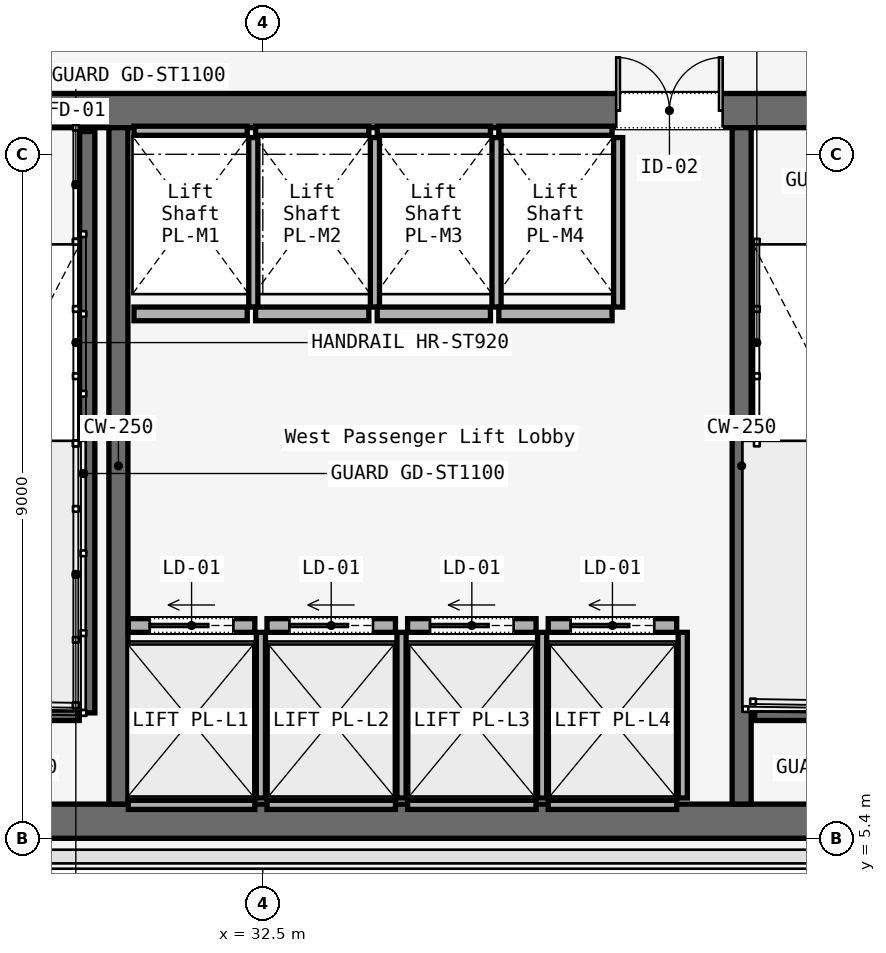
"""IFC4 building model, lengths in metres.
Left out: names, types, materials, properties, quantities, classifications, styles, units other than length and angle.
Written with IfcOpenShell. Run it as: python <this file> out.ifc"""

import sys

from ifc_helpers import new_model, si_unit, direction, frame, frame_2d, origin, place, context, subcontext, project, spatial, rectangle, extrude, element, fill, save


model = new_model("IFC4")
c1 = context("Model", 3, precision=1e-05, world=origin(), true_north=direction((0.0, 1.0)))
c2 = subcontext(c1, "Body", "Model", "MODEL_VIEW")
j1 = project(units=[si_unit("LENGTHUNIT", "METRE"), si_unit("PLANEANGLEUNIT", "RADIAN")], contexts=[c1])
p1 = place(None, origin())
s1 = spatial("IfcSite", under=j1, at=p1, CompositionType="ELEMENT")
p2 = place(p1, origin())
s2 = spatial("IfcBuilding", under=s1, at=p2, CompositionType="ELEMENT")
p3 = place(p2, frame((0.0, 0.0, 108.2)))
s3 = spatial("IfcBuildingStorey", under=s2, at=p3, CompositionType="ELEMENT", Elevation=108.2)
p4 = place(p3, frame((26.45, 14.975, 0.0), z_axis=(0.0, 0.0, 1.0), x_axis=(1.0, 0.0, 0.0)))
e1 = element("IfcWall", 1, at=p4, inside=s3, PredefinedType="SOLIDWALL", context=c2, shape_type="SweptSolid", body=[
    extrude(rectangle(XDim=31.1, YDim=0.45, at=frame_2d((15.55, 0.0))), origin(), (0.0, 0.0, 1.0), 3.52),
])
p5 = place(p4, frame((1.65, 0.0, 0.0)))
e2 = element("IfcOpeningElement", 2, at=p5, cuts=e1, PredefinedType="OPENING", context=c2, shape_type="SweptSolid", body=[
    extrude(rectangle(XDim=1.1, YDim=2.2, at=frame_2d((0.55, 1.1))), frame((0.0, 0.225, 0.0), z_axis=(0.0, -1.0, 0.0), x_axis=(1.0, 0.0, 0.0)), (0.0, 0.0, 1.0), 0.45),
])
p6 = place(p4, frame((13.65, 0.0, 0.0)))
e3 = element("IfcOpeningElement", 3, at=p6, cuts=e1, PredefinedType="OPENING", context=c2, shape_type="SweptSolid", body=[
    extrude(rectangle(XDim=1.1, YDim=2.2, at=frame_2d((0.55, 1.1))), frame((0.0, 0.225, 0.0), z_axis=(0.0, -1.0, 0.0), x_axis=(1.0, 0.0, 0.0)), (0.0, 0.0, 1.0), 0.45),
])
p7 = place(p4, frame((25.55, 0.0, 0.0)))
e4 = element("IfcOpeningElement", 4, at=p7, cuts=e1, PredefinedType="OPENING", context=c2, shape_type="SweptSolid", body=[
    extrude(rectangle(XDim=1.1, YDim=2.2, at=frame_2d((0.55, 1.1))), frame((0.0, 0.225, 0.0), z_axis=(0.0, -1.0, 0.0), x_axis=(1.0, 0.0, 0.0)), (0.0, 0.0, 1.0), 0.45),
])
p8 = place(p4, frame((10.7, 0.0, 0.0)))
e5 = element("IfcOpeningElement", 5, at=p8, cuts=e1, PredefinedType="OPENING", context=c2, shape_type="SweptSolid", body=[
    extrude(rectangle(XDim=1.4, YDim=2.2, at=frame_2d((0.7, 1.1))), frame((0.0, 0.225, 0.0), z_axis=(0.0, -1.0, 0.0), x_axis=(1.0, 0.0, 0.0)), (0.0, 0.0, 1.0), 0.45),
])
p9 = place(p4, frame((19.35, 0.0, 0.0)))
e6 = element("IfcOpeningElement", 6, at=p9, cuts=e1, PredefinedType="OPENING", context=c2, shape_type="SweptSolid", body=[
    extrude(rectangle(XDim=1.1, YDim=2.2, at=frame_2d((0.55, 1.1))), frame((0.0, 0.225, 0.0), z_axis=(0.0, -1.0, 0.0), x_axis=(1.0, 0.0, 0.0)), (0.0, 0.0, 1.0), 0.45),
])
p10 = place(p4, frame((21.4, 0.0, 0.0)))
e7 = element("IfcOpeningElement", 7, at=p10, cuts=e1, PredefinedType="OPENING", context=c2, shape_type="SweptSolid", body=[
    extrude(rectangle(XDim=0.9, YDim=2.1, at=frame_2d((0.45, 1.05))), frame((0.0, 0.225, 0.0), z_axis=(0.0, -1.0, 0.0), x_axis=(1.0, 0.0, 0.0)), (0.0, 0.0, 1.0), 0.45),
])
p11 = place(p4, frame((23.35, 0.0, 0.0)))
e8 = element("IfcOpeningElement", 8, at=p11, cuts=e1, PredefinedType="OPENING", context=c2, shape_type="SweptSolid", body=[
    extrude(rectangle(XDim=1.3, YDim=2.3, at=frame_2d((0.65, 1.15))), frame((0.0, 0.225, 0.0), z_axis=(0.0, -1.0, 0.0), x_axis=(1.0, 0.0, 0.0)), (0.0, 0.0, 1.0), 0.45),
])
p12 = place(p3, frame((26.45, 5.625, 0.0), z_axis=(0.0, 0.0, 1.0), x_axis=(1.0, 0.0, 0.0)))
e9 = element("IfcWall", 9, at=p12, inside=s3, PredefinedType="SOLIDWALL", context=c2, shape_type="SweptSolid", body=[
    extrude(rectangle(XDim=31.1, YDim=0.45, at=frame_2d((15.55, 0.0))), origin(), (0.0, 0.0, 1.0), 3.52),
])
for number, where, z_axis, x_axis in (
    (10, (30.6, 5.85, 0.0), (0.0, 0.0, 1.0), (0.0, 1.0, 0.0)),
    (11, (38.8, 5.85, 0.0), (0.0, 0.0, 1.0), (0.0, 1.0, 0.0)),
):
    element("IfcWall", number, at=place(p3, frame(where, z_axis=z_axis, x_axis=x_axis)), inside=s3, PredefinedType="SOLIDWALL", context=c2, shape_type="SweptSolid", body=[
        extrude(rectangle(XDim=8.9, YDim=0.25, at=frame_2d((4.45, 0.0))), origin(), (0.0, 0.0, 1.0), 3.52),
    ])
p13 = place(p3, frame((30.19, 14.7, 0.0), z_axis=(0.0, 0.0, 1.0), x_axis=(0.0, -1.0, 0.0)))
e12 = element("IfcWall", 12, at=p13, inside=s3, PredefinedType="SOLIDWALL", context=c2, shape_type="SweptSolid", body=[
    extrude(rectangle(XDim=7.65, YDim=0.2, at=frame_2d((3.825, 0.0))), origin(), (0.0, 0.0, 1.0), 3.8),
])
for number, where, z_axis, x_axis in (
    (13, (26.97, 7.05, 0.0), (0.0, 0.0, 1.0), (1.0, 0.0, 0.0)),
    (14, (38.97, 7.05, 0.0), (0.0, 0.0, 1.0), (1.0, 0.0, 0.0)),
):
    element("IfcWall", number, at=place(p3, frame(where, z_axis=z_axis, x_axis=x_axis)), inside=s3, PredefinedType="SOLIDWALL", context=c2, shape_type="SweptSolid", body=[
        extrude(rectangle(XDim=3.115, YDim=0.2, at=frame_2d((1.558, 0.0))), origin(), (0.0, 0.0, 1.0), 3.8),
    ])
p14 = place(p3, frame((30.73, 8.2, 0.0), z_axis=(0.0, 0.0, 1.0), x_axis=(1.0, 0.0, 0.0)))
e15 = element("IfcWall", 15, at=p14, inside=s3, PredefinedType="SOLIDWALL", context=c2, shape_type="SweptSolid", body=[
    extrude(rectangle(XDim=1.665, YDim=0.18, at=frame_2d((0.833, 0.0))), origin(), (0.0, 0.0, 1.0), 2.95),
])
p15 = place(p14, frame((0.282, 0.0, 0.0)))
e16 = element("IfcOpeningElement", 16, at=p15, cuts=e15, PredefinedType="OPENING", context=c2, shape_type="SweptSolid", body=[
    extrude(rectangle(XDim=1.1, YDim=2.2, at=frame_2d((0.55, 1.1))), frame((0.0, 0.09, 0.0), z_axis=(0.0, -1.0, 0.0), x_axis=(1.0, 0.0, 0.0)), (0.0, 0.0, 1.0), 0.18),
])
p16 = place(p3, frame((30.73, 5.84, 0.0), z_axis=(0.0, 0.0, 1.0), x_axis=(1.0, 0.0, 0.0)))
e17 = element("IfcWall", 17, at=p16, inside=s3, PredefinedType="SOLIDWALL", context=c2, shape_type="SweptSolid", body=[
    extrude(rectangle(XDim=1.665, YDim=0.12, at=frame_2d((0.833, 0.0))), origin(), (0.0, 0.0, 1.0), 2.95),
])
p17 = place(p3, frame((32.475, 5.93, 0.0), z_axis=(0.0, 0.0, 1.0), x_axis=(0.0, 1.0, 0.0)))
e18 = element("IfcWall", 18, at=p17, inside=s3, PredefinedType="SOLIDWALL", context=c2, shape_type="SweptSolid", body=[
    extrude(rectangle(XDim=2.18, YDim=0.12, at=frame_2d((1.09, 0.0))), origin(), (0.0, 0.0, 1.0), 2.95),
])
p18 = place(p3, frame((32.555, 8.2, 0.0), z_axis=(0.0, 0.0, 1.0), x_axis=(1.0, 0.0, 0.0)))
e19 = element("IfcWall", 19, at=p18, inside=s3, PredefinedType="SOLIDWALL", context=c2, shape_type="SweptSolid", body=[
    extrude(rectangle(XDim=1.69, YDim=0.18, at=frame_2d((0.845, 0.0))), origin(), (0.0, 0.0, 1.0), 2.95),
])
p19 = place(p18, frame((0.295, 0.0, 0.0)))
e20 = element("IfcOpeningElement", 20, at=p19, cuts=e19, PredefinedType="OPENING", context=c2, shape_type="SweptSolid", body=[
    extrude(rectangle(XDim=1.1, YDim=2.2, at=frame_2d((0.55, 1.1))), frame((0.0, 0.09, 0.0), z_axis=(0.0, -1.0, 0.0), x_axis=(1.0, 0.0, 0.0)), (0.0, 0.0, 1.0), 0.18),
])
p20 = place(p3, frame((32.555, 5.84, 0.0), z_axis=(0.0, 0.0, 1.0), x_axis=(1.0, 0.0, 0.0)))
e21 = element("IfcWall", 21, at=p20, inside=s3, PredefinedType="SOLIDWALL", context=c2, shape_type="SweptSolid", body=[
    extrude(rectangle(XDim=1.69, YDim=0.12, at=frame_2d((0.845, 0.0))), origin(), (0.0, 0.0, 1.0), 2.95),
])
p21 = place(p3, frame((34.325, 5.93, 0.0), z_axis=(0.0, 0.0, 1.0), x_axis=(0.0, 1.0, 0.0)))
e22 = element("IfcWall", 22, at=p21, inside=s3, PredefinedType="SOLIDWALL", context=c2, shape_type="SweptSolid", body=[
    extrude(rectangle(XDim=2.18, YDim=0.12, at=frame_2d((1.09, 0.0))), origin(), (0.0, 0.0, 1.0), 2.95),
])
p22 = place(p3, frame((34.405, 8.2, 0.0), z_axis=(0.0, 0.0, 1.0), x_axis=(1.0, 0.0, 0.0)))
e23 = element("IfcWall", 23, at=p22, inside=s3, PredefinedType="SOLIDWALL", context=c2, shape_type="SweptSolid", body=[
    extrude(rectangle(XDim=1.69, YDim=0.18, at=frame_2d((0.845, 0.0))), origin(), (0.0, 0.0, 1.0), 2.95),
])
p23 = place(p22, frame((0.295, 0.0, 0.0)))
e24 = element("IfcOpeningElement", 24, at=p23, cuts=e23, PredefinedType="OPENING", context=c2, shape_type="SweptSolid", body=[
    extrude(rectangle(XDim=1.1, YDim=2.2, at=frame_2d((0.55, 1.1))), frame((0.0, 0.09, 0.0), z_axis=(0.0, -1.0, 0.0), x_axis=(1.0, 0.0, 0.0)), (0.0, 0.0, 1.0), 0.18),
])
p24 = place(p3, frame((34.405, 5.84, 0.0), z_axis=(0.0, 0.0, 1.0), x_axis=(1.0, 0.0, 0.0)))
e25 = element("IfcWall", 25, at=p24, inside=s3, PredefinedType="SOLIDWALL", context=c2, shape_type="SweptSolid", body=[
    extrude(rectangle(XDim=1.69, YDim=0.12, at=frame_2d((0.845, 0.0))), origin(), (0.0, 0.0, 1.0), 2.95),
])
p25 = place(p3, frame((36.175, 5.93, 0.0), z_axis=(0.0, 0.0, 1.0), x_axis=(0.0, 1.0, 0.0)))
e26 = element("IfcWall", 26, at=p25, inside=s3, PredefinedType="SOLIDWALL", context=c2, shape_type="SweptSolid", body=[
    extrude(rectangle(XDim=2.18, YDim=0.12, at=frame_2d((1.09, 0.0))), origin(), (0.0, 0.0, 1.0), 2.95),
])
p26 = place(p3, frame((36.255, 8.2, 0.0), z_axis=(0.0, 0.0, 1.0), x_axis=(1.0, 0.0, 0.0)))
e27 = element("IfcWall", 27, at=p26, inside=s3, PredefinedType="SOLIDWALL", context=c2, shape_type="SweptSolid", body=[
    extrude(rectangle(XDim=1.69, YDim=0.18, at=frame_2d((0.845, 0.0))), origin(), (0.0, 0.0, 1.0), 2.95),
])
p27 = place(p26, frame((0.295, 0.0, 0.0)))
e28 = element("IfcOpeningElement", 28, at=p27, cuts=e27, PredefinedType="OPENING", context=c2, shape_type="SweptSolid", body=[
    extrude(rectangle(XDim=1.1, YDim=2.2, at=frame_2d((0.55, 1.1))), frame((0.0, 0.09, 0.0), z_axis=(0.0, -1.0, 0.0), x_axis=(1.0, 0.0, 0.0)), (0.0, 0.0, 1.0), 0.18),
])
p28 = place(p3, frame((36.255, 5.84, 0.0), z_axis=(0.0, 0.0, 1.0), x_axis=(1.0, 0.0, 0.0)))
e29 = element("IfcWall", 29, at=p28, inside=s3, PredefinedType="SOLIDWALL", context=c2, shape_type="SweptSolid", body=[
    extrude(rectangle(XDim=1.69, YDim=0.12, at=frame_2d((0.845, 0.0))), origin(), (0.0, 0.0, 1.0), 2.95),
])
p29 = place(p3, frame((38.025, 5.93, 0.0), z_axis=(0.0, 0.0, 1.0), x_axis=(0.0, 1.0, 0.0)))
e30 = element("IfcWall", 30, at=p29, inside=s3, PredefinedType="SOLIDWALL", context=c2, shape_type="SweptSolid", body=[
    extrude(rectangle(XDim=2.18, YDim=0.12, at=frame_2d((1.09, 0.0))), origin(), (0.0, 0.0, 1.0), 2.95),
])
p30 = place(p3, frame((30.805, 12.3, 0.0), z_axis=(0.0, 0.0, 1.0), x_axis=(1.0, 0.0, 0.0)))
e31 = element("IfcWall", 31, at=p30, inside=s3, PredefinedType="SOLIDWALL", context=c2, shape_type="SweptSolid", body=[
    extrude(rectangle(XDim=1.49, YDim=0.18, at=frame_2d((0.745, 0.0))), origin(), (0.0, 0.0, 1.0), 2.95),
])
p31 = place(p3, frame((30.805, 14.71, 0.0), z_axis=(0.0, 0.0, 1.0), x_axis=(1.0, 0.0, 0.0)))
e32 = element("IfcWall", 32, at=p31, inside=s3, PredefinedType="SOLIDWALL", context=c2, shape_type="SweptSolid", body=[
    extrude(rectangle(XDim=1.49, YDim=0.12, at=frame_2d((0.745, 0.0))), origin(), (0.0, 0.0, 1.0), 2.95),
])
p32 = place(p3, frame((32.375, 12.39, 0.0), z_axis=(0.0, 0.0, 1.0), x_axis=(0.0, 1.0, 0.0)))
e33 = element("IfcWall", 33, at=p32, inside=s3, PredefinedType="SOLIDWALL", context=c2, shape_type="SweptSolid", body=[
    extrude(rectangle(XDim=2.23, YDim=0.12, at=frame_2d((1.115, 0.0))), origin(), (0.0, 0.0, 1.0), 2.95),
])
p33 = place(p3, frame((32.405, 12.3, 0.0), z_axis=(0.0, 0.0, 1.0), x_axis=(1.0, 0.0, 0.0)))
e34 = element("IfcWall", 34, at=p33, inside=s3, PredefinedType="SOLIDWALL", context=c2, shape_type="SweptSolid", body=[
    extrude(rectangle(XDim=1.49, YDim=0.18, at=frame_2d((0.745, 0.0))), origin(), (0.0, 0.0, 1.0), 2.95),
])
p34 = place(p3, frame((32.405, 14.71, 0.0), z_axis=(0.0, 0.0, 1.0), x_axis=(1.0, 0.0, 0.0)))
e35 = element("IfcWall", 35, at=p34, inside=s3, PredefinedType="SOLIDWALL", context=c2, shape_type="SweptSolid", body=[
    extrude(rectangle(XDim=1.49, YDim=0.12, at=frame_2d((0.745, 0.0))), origin(), (0.0, 0.0, 1.0), 2.95),
])
p35 = place(p3, frame((33.975, 12.39, 0.0), z_axis=(0.0, 0.0, 1.0), x_axis=(0.0, 1.0, 0.0)))
e36 = element("IfcWall", 36, at=p35, inside=s3, PredefinedType="SOLIDWALL", context=c2, shape_type="SweptSolid", body=[
    extrude(rectangle(XDim=2.23, YDim=0.12, at=frame_2d((1.115, 0.0))), origin(), (0.0, 0.0, 1.0), 2.95),
])
p36 = place(p3, frame((34.005, 12.3, 0.0), z_axis=(0.0, 0.0, 1.0), x_axis=(1.0, 0.0, 0.0)))
e37 = element("IfcWall", 37, at=p36, inside=s3, PredefinedType="SOLIDWALL", context=c2, shape_type="SweptSolid", body=[
    extrude(rectangle(XDim=1.49, YDim=0.18, at=frame_2d((0.745, 0.0))), origin(), (0.0, 0.0, 1.0), 2.95),
])
p37 = place(p3, frame((34.005, 14.71, 0.0), z_axis=(0.0, 0.0, 1.0), x_axis=(1.0, 0.0, 0.0)))
e38 = element("IfcWall", 38, at=p37, inside=s3, PredefinedType="SOLIDWALL", context=c2, shape_type="SweptSolid", body=[
    extrude(rectangle(XDim=1.49, YDim=0.12, at=frame_2d((0.745, 0.0))), origin(), (0.0, 0.0, 1.0), 2.95),
])
p38 = place(p3, frame((35.575, 12.39, 0.0), z_axis=(0.0, 0.0, 1.0), x_axis=(0.0, 1.0, 0.0)))
e39 = element("IfcWall", 39, at=p38, inside=s3, PredefinedType="SOLIDWALL", context=c2, shape_type="SweptSolid", body=[
    extrude(rectangle(XDim=2.23, YDim=0.12, at=frame_2d((1.115, 0.0))), origin(), (0.0, 0.0, 1.0), 2.95),
])
p39 = place(p3, frame((35.605, 12.3, 0.0), z_axis=(0.0, 0.0, 1.0), x_axis=(1.0, 0.0, 0.0)))
e40 = element("IfcWall", 40, at=p39, inside=s3, PredefinedType="SOLIDWALL", context=c2, shape_type="SweptSolid", body=[
    extrude(rectangle(XDim=1.49, YDim=0.18, at=frame_2d((0.745, 0.0))), origin(), (0.0, 0.0, 1.0), 2.95),
])
p40 = place(p3, frame((35.605, 14.71, 0.0), z_axis=(0.0, 0.0, 1.0), x_axis=(1.0, 0.0, 0.0)))
e41 = element("IfcWall", 41, at=p40, inside=s3, PredefinedType="SOLIDWALL", context=c2, shape_type="SweptSolid", body=[
    extrude(rectangle(XDim=1.49, YDim=0.12, at=frame_2d((0.745, 0.0))), origin(), (0.0, 0.0, 1.0), 2.95),
])
p41 = place(p3, frame((37.175, 12.39, 0.0), z_axis=(0.0, 0.0, 1.0), x_axis=(0.0, 1.0, 0.0)))
e42 = element("IfcWall", 42, at=p41, inside=s3, PredefinedType="SOLIDWALL", context=c2, shape_type="SweptSolid", body=[
    extrude(rectangle(XDim=2.23, YDim=0.12, at=frame_2d((1.115, 0.0))), origin(), (0.0, 0.0, 1.0), 2.95),
])
p42 = place(p8, origin())
e43 = element("IfcDoor", 43, at=p42, inside=s3, OperationType="DOUBLE_DOOR_SINGLE_SWING", PredefinedType="DOOR", context=c2, shape_type="SweptSolid", body=[
    extrude(rectangle(XDim=1.4, YDim=2.2, at=frame_2d((0.7, 1.1))), frame((0.0, 0.025, 0.0), z_axis=(0.0, -1.0, 0.0), x_axis=(1.0, 0.0, 0.0)), (0.0, 0.0, 1.0), 0.05),
])
fill(e5, e43)
p43 = place(p15, origin())
e44 = element("IfcDoor", 44, at=p43, inside=s3, OperationType="SLIDING_TO_LEFT", PredefinedType="DOOR", context=c2, shape_type="SweptSolid", body=[
    extrude(rectangle(XDim=1.1, YDim=2.2, at=frame_2d((0.55, 1.1))), frame((0.0, 0.025, 0.0), z_axis=(0.0, -1.0, 0.0), x_axis=(1.0, 0.0, 0.0)), (0.0, 0.0, 1.0), 0.05),
])
fill(e16, e44)
p44 = place(p19, origin())
e45 = element("IfcDoor", 45, at=p44, inside=s3, OperationType="SLIDING_TO_LEFT", PredefinedType="DOOR", context=c2, shape_type="SweptSolid", body=[
    extrude(rectangle(XDim=1.1, YDim=2.2, at=frame_2d((0.55, 1.1))), frame((0.0, 0.025, 0.0), z_axis=(0.0, -1.0, 0.0), x_axis=(1.0, 0.0, 0.0)), (0.0, 0.0, 1.0), 0.05),
])
fill(e20, e45)
p45 = place(p23, origin())
e46 = element("IfcDoor", 46, at=p45, inside=s3, OperationType="SLIDING_TO_LEFT", PredefinedType="DOOR", context=c2, shape_type="SweptSolid", body=[
    extrude(rectangle(XDim=1.1, YDim=2.2, at=frame_2d((0.55, 1.1))), frame((0.0, 0.025, 0.0), z_axis=(0.0, -1.0, 0.0), x_axis=(1.0, 0.0, 0.0)), (0.0, 0.0, 1.0), 0.05),
])
fill(e24, e46)
p46 = place(p27, origin())
e47 = element("IfcDoor", 47, at=p46, inside=s3, OperationType="SLIDING_TO_LEFT", PredefinedType="DOOR", context=c2, shape_type="SweptSolid", body=[
    extrude(rectangle(XDim=1.1, YDim=2.2, at=frame_2d((0.55, 1.1))), frame((0.0, 0.025, 0.0), z_axis=(0.0, -1.0, 0.0), x_axis=(1.0, 0.0, 0.0)), (0.0, 0.0, 1.0), 0.05),
])
fill(e28, e47)
save(model, sys.argv[1])
